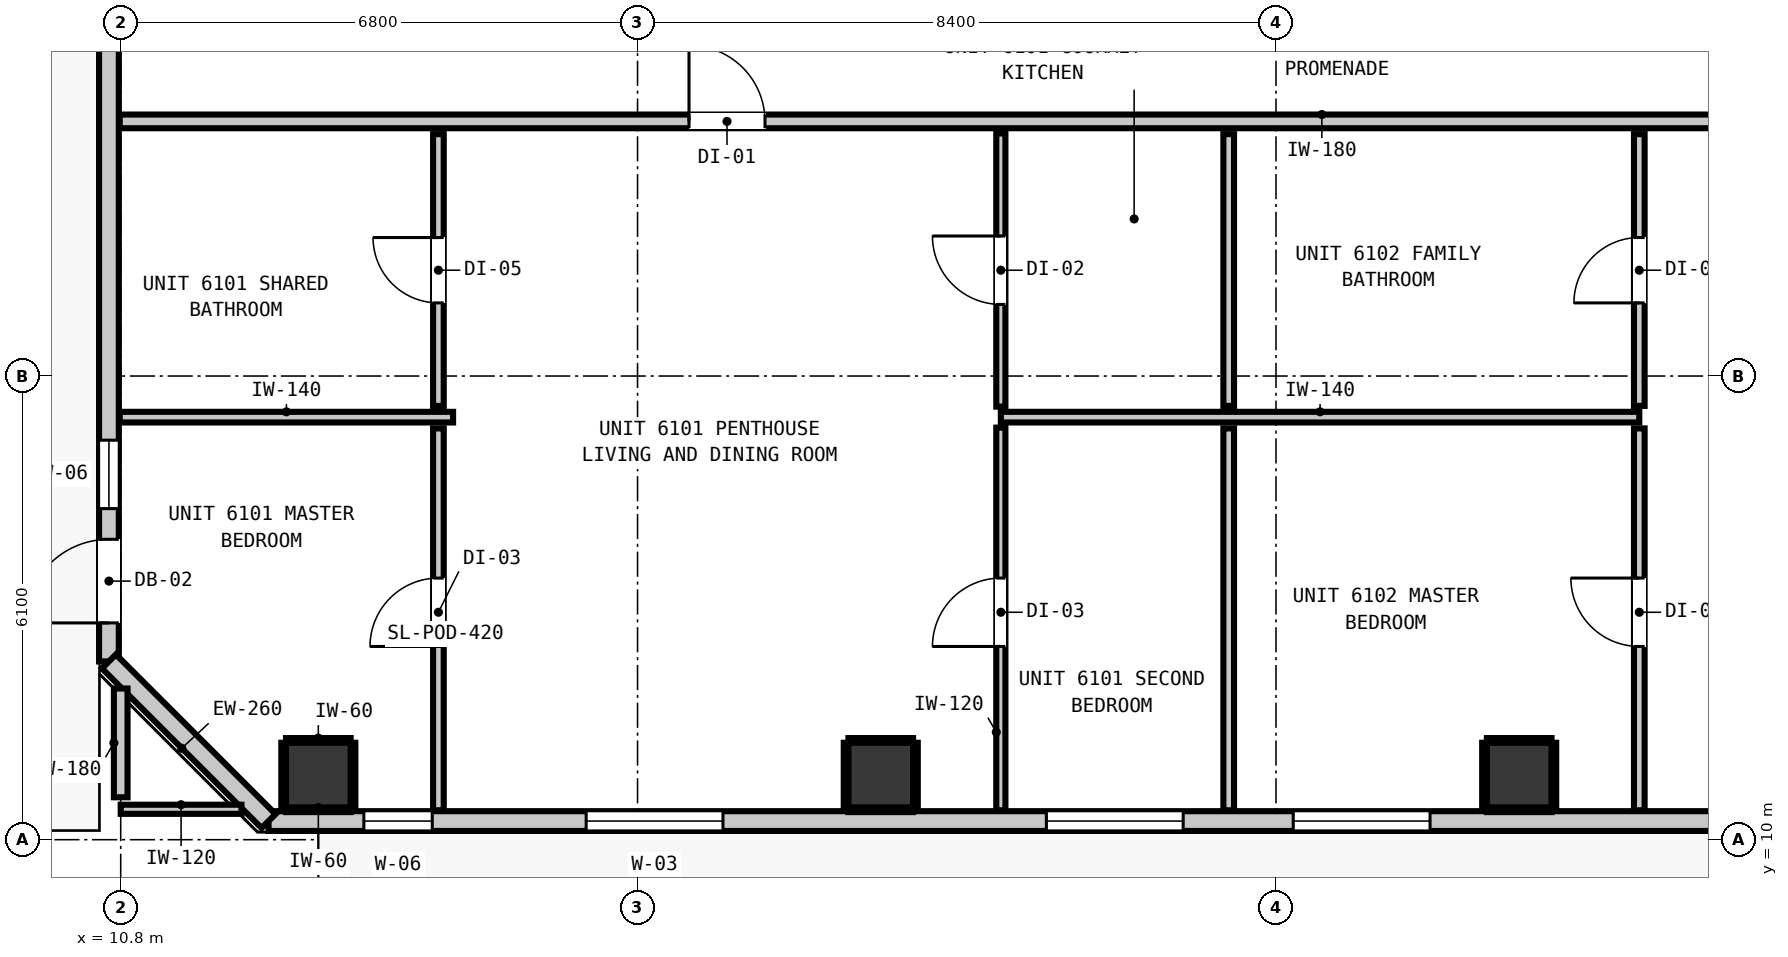
"""IFC4 building model, lengths in metres.
Left out: names, types, materials, properties, quantities, classifications, styles, units other than length and angle.
Written with IfcOpenShell. Run it as: python <this file> out.ifc"""

import sys

from ifc_helpers import new_model, si_unit, direction, frame, frame_2d, origin, origin_2d, place, context, subcontext, project, spatial, rectangle, extrude, element, fill, save


model = new_model("IFC4")
c1 = context("Model", 3, precision=1e-05, world=origin(), true_north=direction((0.0, 1.0)))
c2 = subcontext(c1, "Body", "Model", "MODEL_VIEW")
j1 = project(units=[si_unit("LENGTHUNIT", "METRE"), si_unit("PLANEANGLEUNIT", "RADIAN")], contexts=[c1])
p1 = place(None, origin())
s1 = spatial("IfcSite", under=j1, at=p1, CompositionType="ELEMENT")
p2 = place(p1, origin())
s2 = spatial("IfcBuilding", under=s1, at=p2, CompositionType="ELEMENT")
p3 = place(p2, frame((0.0, 0.0, 210.08)))
s3 = spatial("IfcBuildingStorey", under=s2, at=p3, CompositionType="ELEMENT", Elevation=210.08)
for number, where, z_axis, x_axis in (
    (1, (13.4, 10.85, -0.2), (0.0, 0.0, 1.0), (1.0, 0.0, 0.0)),
    (2, (20.8, 10.85, -0.2), (0.0, 0.0, 1.0), (1.0, 0.0, 0.0)),
    (3, (29.2, 10.85, -0.2), (0.0, 0.0, 1.0), (1.0, 0.0, 0.0)),
):
    element("IfcColumn", number, at=place(p3, frame(where, z_axis=z_axis, x_axis=x_axis)), inside=s3, PredefinedType="COLUMN", context=c2, shape_type="SweptSolid", body=[
        extrude(rectangle(XDim=0.85, YDim=0.85, at=origin_2d()), origin(), (0.0, 0.0, 1.0), 3.52),
    ])
p4 = place(p3, frame((10.645, 12.345, 0.0), z_axis=(0.0, 0.0, 1.0), x_axis=(0.0, 1.0, 0.0)))
e4 = element("IfcWall", 4, at=p4, inside=s3, PredefinedType="STANDARD", context=c2, shape_type="SweptSolid", body=[
    extrude(rectangle(XDim=30.31, YDim=0.26, at=frame_2d((15.155, 0.0))), origin(), (0.0, 0.0, 1.0), 3.1),
])
p5 = place(p4, frame((0.507, 0.0, 0.0)))
e5 = element("IfcOpeningElement", 5, at=p5, cuts=e4, PredefinedType="OPENING", context=c2, shape_type="SweptSolid", body=[
    extrude(rectangle(XDim=1.1, YDim=2.15, at=frame_2d((0.55, 1.075))), frame((0.0, 0.14, 0.0), z_axis=(0.0, -1.0, 0.0), x_axis=(1.0, 0.0, 0.0)), (0.0, 0.0, 1.0), 0.28),
])
p6 = place(p4, frame((2.011, 0.0, 0.85)))
e6 = element("IfcOpeningElement", 6, at=p6, cuts=e4, PredefinedType="OPENING", context=c2, shape_type="SweptSolid", body=[
    extrude(rectangle(XDim=0.9, YDim=1.5, at=frame_2d((0.45, 0.75))), frame((0.0, 0.14, 0.0), z_axis=(0.0, -1.0, 0.0), x_axis=(1.0, 0.0, 0.0)), (0.0, 0.0, 1.0), 0.28),
])
p7 = place(p3, frame((45.455, 10.245, 0.0), z_axis=(0.0, 0.0, 1.0), x_axis=(-1.0, 0.0, 0.0)))
e7 = element("IfcWall", 7, at=p7, inside=s3, PredefinedType="STANDARD", context=c2, shape_type="SweptSolid", body=[
    extrude(rectangle(XDim=32.71, YDim=0.26, at=frame_2d((16.355, 0.0))), origin(), (0.0, 0.0, 1.0), 3.1),
])
p8 = place(p7, frame((2.665, 0.0, 0.0)))
e8 = element("IfcOpeningElement", 8, at=p8, cuts=e7, PredefinedType="OPENING", context=c2, shape_type="SweptSolid", body=[
    extrude(rectangle(XDim=1.0, YDim=2.15, at=frame_2d((0.5, 1.075))), frame((0.0, 0.14, 0.0), z_axis=(0.0, -1.0, 0.0), x_axis=(1.0, 0.0, 0.0)), (0.0, 0.0, 1.0), 0.28),
])
p9 = place(p7, frame((26.731, 0.0, 0.85)))
e9 = element("IfcOpeningElement", 9, at=p9, cuts=e7, PredefinedType="OPENING", context=c2, shape_type="SweptSolid", body=[
    extrude(rectangle(XDim=1.8, YDim=1.9, at=frame_2d((0.9, 0.95))), frame((0.0, 0.14, 0.0), z_axis=(0.0, -1.0, 0.0), x_axis=(1.0, 0.0, 0.0)), (0.0, 0.0, 1.0), 0.28),
])
p10 = place(p7, frame((30.556, 0.0, 0.85)))
e10 = element("IfcOpeningElement", 10, at=p10, cuts=e7, PredefinedType="OPENING", context=c2, shape_type="SweptSolid", body=[
    extrude(rectangle(XDim=0.9, YDim=1.5, at=frame_2d((0.45, 0.75))), frame((0.0, 0.14, 0.0), z_axis=(0.0, -1.0, 0.0), x_axis=(1.0, 0.0, 0.0)), (0.0, 0.0, 1.0), 0.28),
])
p11 = place(p7, frame((20.676, 0.0, 0.85)))
e11 = element("IfcOpeningElement", 11, at=p11, cuts=e7, PredefinedType="OPENING", context=c2, shape_type="SweptSolid", body=[
    extrude(rectangle(XDim=1.8, YDim=1.9, at=frame_2d((0.9, 0.95))), frame((0.0, 0.14, 0.0), z_axis=(0.0, -1.0, 0.0), x_axis=(1.0, 0.0, 0.0)), (0.0, 0.0, 1.0), 0.28),
])
p12 = place(p7, frame((11.077, 0.0, 0.85)))
e12 = element("IfcOpeningElement", 12, at=p12, cuts=e7, PredefinedType="OPENING", context=c2, shape_type="SweptSolid", body=[
    extrude(rectangle(XDim=1.8, YDim=1.9, at=frame_2d((0.9, 0.95))), frame((0.0, 0.14, 0.0), z_axis=(0.0, -1.0, 0.0), x_axis=(1.0, 0.0, 0.0)), (0.0, 0.0, 1.0), 0.28),
])
p13 = place(p7, frame((17.428, 0.0, 0.85)))
e13 = element("IfcOpeningElement", 13, at=p13, cuts=e7, PredefinedType="OPENING", context=c2, shape_type="SweptSolid", body=[
    extrude(rectangle(XDim=1.8, YDim=1.9, at=frame_2d((0.9, 0.95))), frame((0.0, 0.14, 0.0), z_axis=(0.0, -1.0, 0.0), x_axis=(1.0, 0.0, 0.0)), (0.0, 0.0, 1.0), 0.28),
])
p14 = place(p7, frame((4.67, 0.0, 0.85)))
e14 = element("IfcOpeningElement", 14, at=p14, cuts=e7, PredefinedType="OPENING", context=c2, shape_type="SweptSolid", body=[
    extrude(rectangle(XDim=1.8, YDim=1.9, at=frame_2d((0.9, 0.95))), frame((0.0, 0.14, 0.0), z_axis=(0.0, -1.0, 0.0), x_axis=(1.0, 0.0, 0.0)), (0.0, 0.0, 1.0), 0.28),
])
p15 = place(p7, frame((0.548, 0.0, 0.85)))
e15 = element("IfcOpeningElement", 15, at=p15, cuts=e7, PredefinedType="OPENING", context=c2, shape_type="SweptSolid", body=[
    extrude(rectangle(XDim=1.05, YDim=1.65, at=frame_2d((0.525, 0.825))), frame((0.0, 0.14, 0.0), z_axis=(0.0, -1.0, 0.0), x_axis=(1.0, 0.0, 0.0)), (0.0, 0.0, 1.0), 0.28),
])
p16 = place(p3, frame((12.745, 10.245, 0.0), z_axis=(0.0, 0.0, 1.0), x_axis=(-0.707147883682, 0.707065676302, 0.0)))
e16 = element("IfcWall", 16, at=p16, inside=s3, PredefinedType="STANDARD", context=c2, shape_type="SweptSolid", body=[
    extrude(rectangle(XDim=2.97, YDim=0.26, at=frame_2d((1.485, 0.0))), origin(), (0.0, 0.0, 1.0), 3.1),
])
p17 = place(p3, frame((10.787, 19.45, 0.0), z_axis=(0.0, 0.0, 1.0), x_axis=(1.0, 0.0, 0.0)))
e17 = element("IfcWall", 17, at=p17, inside=s3, PredefinedType="PARTITIONING", context=c2, shape_type="SweptSolid", body=[
    extrude(rectangle(XDim=36.626, YDim=0.18, at=frame_2d((18.313, 0.0))), origin(), (0.0, 0.0, 1.0), 3.1),
])
p18 = place(p17, frame((7.49, 0.0, 0.0)))
e18 = element("IfcOpeningElement", 18, at=p18, cuts=e17, PredefinedType="OPENING", context=c2, shape_type="SweptSolid", body=[
    extrude(rectangle(XDim=1.0, YDim=2.15, at=frame_2d((0.5, 1.075))), frame((0.0, 0.1, 0.0), z_axis=(0.0, -1.0, 0.0), x_axis=(1.0, 0.0, 0.0)), (0.0, 0.0, 1.0), 0.2),
])
p19 = place(p17, frame((23.143, 0.0, 0.0)))
e19 = element("IfcOpeningElement", 19, at=p19, cuts=e17, PredefinedType="OPENING", context=c2, shape_type="SweptSolid", body=[
    extrude(rectangle(XDim=1.0, YDim=2.15, at=frame_2d((0.5, 1.075))), frame((0.0, 0.1, 0.0), z_axis=(0.0, -1.0, 0.0), x_axis=(1.0, 0.0, 0.0)), (0.0, 0.0, 1.0), 0.2),
])
p20 = place(p3, frame((10.787, 15.559, 0.0), z_axis=(0.0, 0.0, 1.0), x_axis=(1.0, 0.0, 0.0)))
e20 = element("IfcWall", 20, at=p20, inside=s3, PredefinedType="PARTITIONING", context=c2, shape_type="SweptSolid", body=[
    extrude(rectangle(XDim=4.386, YDim=0.14, at=frame_2d((2.193, 0.0))), origin(), (0.0, 0.0, 1.0), 3.1),
])
p21 = place(p3, frame((22.38, 15.559, 0.0), z_axis=(0.0, 0.0, 1.0), x_axis=(1.0, 0.0, 0.0)))
e21 = element("IfcWall", 21, at=p21, inside=s3, PredefinedType="PARTITIONING", context=c2, shape_type="SweptSolid", body=[
    extrude(rectangle(XDim=8.4, YDim=0.14, at=frame_2d((4.2, 0.0))), origin(), (0.0, 0.0, 1.0), 3.1),
])
p22 = place(p3, frame((10.8, 10.4, 0.0), z_axis=(0.0, 0.0, 1.0), x_axis=(1.0, 0.0, 0.0)))
e22 = element("IfcWall", 22, at=p22, inside=s3, PredefinedType="PARTITIONING", context=c2, shape_type="SweptSolid", body=[
    extrude(rectangle(XDim=1.589, YDim=0.12, at=frame_2d((0.794, 0.0))), origin(), (0.0, 0.0, 1.0), 3.1),
])
p23 = place(p3, frame((10.8, 10.558, 0.0), z_axis=(0.0, 0.0, 1.0), x_axis=(0.0, 1.0, 0.0)))
e23 = element("IfcWall", 23, at=p23, inside=s3, PredefinedType="PARTITIONING", context=c2, shape_type="SweptSolid", body=[
    extrude(rectangle(XDim=1.431, YDim=0.18, at=frame_2d((0.715, 0.0))), origin(), (0.0, 0.0, 1.0), 3.1),
])
p24 = place(p3, frame((14.98, 10.387, 0.0), z_axis=(0.0, 0.0, 1.0), x_axis=(0.0, 1.0, 0.0)))
e24 = element("IfcWall", 24, at=p24, inside=s3, PredefinedType="PARTITIONING", context=c2, shape_type="SweptSolid", body=[
    extrude(rectangle(XDim=5.024, YDim=0.14, at=frame_2d((2.512, 0.0))), origin(), (0.0, 0.0, 1.0), 3.1),
])
p25 = place(p24, frame((2.155, 0.0, 0.0)))
e25 = element("IfcOpeningElement", 25, at=p25, cuts=e24, PredefinedType="OPENING", context=c2, shape_type="SweptSolid", body=[
    extrude(rectangle(XDim=0.9, YDim=2.1, at=frame_2d((0.45, 1.05))), frame((0.0, 0.08, 0.0), z_axis=(0.0, -1.0, 0.0), x_axis=(1.0, 0.0, 0.0)), (0.0, 0.0, 1.0), 0.16),
])
p26 = place(p3, frame((14.98, 15.707, 0.0), z_axis=(0.0, 0.0, 1.0), x_axis=(0.0, 1.0, 0.0)))
e26 = element("IfcWall", 26, at=p26, inside=s3, PredefinedType="PARTITIONING", context=c2, shape_type="SweptSolid", body=[
    extrude(rectangle(XDim=3.575, YDim=0.14, at=frame_2d((1.788, 0.0))), origin(), (0.0, 0.0, 1.0), 3.1),
])
p27 = place(p26, frame((1.355, 0.0, 0.0)))
e27 = element("IfcOpeningElement", 27, at=p27, cuts=e26, PredefinedType="OPENING", context=c2, shape_type="SweptSolid", body=[
    extrude(rectangle(XDim=0.86, YDim=2.02, at=frame_2d((0.43, 1.01))), frame((0.0, 0.08, 0.0), z_axis=(0.0, -1.0, 0.0), x_axis=(1.0, 0.0, 0.0)), (0.0, 0.0, 1.0), 0.16),
])
p28 = place(p3, frame((25.378, 10.387, 0.0), z_axis=(0.0, 0.0, 1.0), x_axis=(0.0, 1.0, 0.0)))
e28 = element("IfcWall", 28, at=p28, inside=s3, PredefinedType="PARTITIONING", context=c2, shape_type="SweptSolid", body=[
    extrude(rectangle(XDim=5.024, YDim=0.14, at=frame_2d((2.512, 0.0))), origin(), (0.0, 0.0, 1.0), 3.1),
])
p29 = place(p3, frame((25.378, 15.707, 0.0), z_axis=(0.0, 0.0, 1.0), x_axis=(0.0, 1.0, 0.0)))
e29 = element("IfcWall", 29, at=p29, inside=s3, PredefinedType="PARTITIONING", context=c2, shape_type="SweptSolid", body=[
    extrude(rectangle(XDim=3.575, YDim=0.14, at=frame_2d((1.788, 0.0))), origin(), (0.0, 0.0, 1.0), 3.1),
])
p30 = place(p3, frame((30.78, 10.387, 0.0), z_axis=(0.0, 0.0, 1.0), x_axis=(0.0, 1.0, 0.0)))
e30 = element("IfcWall", 30, at=p30, inside=s3, PredefinedType="PARTITIONING", context=c2, shape_type="SweptSolid", body=[
    extrude(rectangle(XDim=5.024, YDim=0.14, at=frame_2d((2.512, 0.0))), origin(), (0.0, 0.0, 1.0), 3.1),
])
p31 = place(p30, frame((2.155, 0.0, 0.0)))
e31 = element("IfcOpeningElement", 31, at=p31, cuts=e30, PredefinedType="OPENING", context=c2, shape_type="SweptSolid", body=[
    extrude(rectangle(XDim=0.9, YDim=2.1, at=frame_2d((0.45, 1.05))), frame((0.0, 0.08, 0.0), z_axis=(0.0, -1.0, 0.0), x_axis=(1.0, 0.0, 0.0)), (0.0, 0.0, 1.0), 0.16),
])
p32 = place(p3, frame((30.78, 15.707, 0.0), z_axis=(0.0, 0.0, 1.0), x_axis=(0.0, 1.0, 0.0)))
e32 = element("IfcWall", 32, at=p32, inside=s3, PredefinedType="PARTITIONING", context=c2, shape_type="SweptSolid", body=[
    extrude(rectangle(XDim=3.575, YDim=0.14, at=frame_2d((1.788, 0.0))), origin(), (0.0, 0.0, 1.0), 3.1),
])
p33 = place(p32, frame((1.355, 0.0, 0.0)))
e33 = element("IfcOpeningElement", 33, at=p33, cuts=e32, PredefinedType="OPENING", context=c2, shape_type="SweptSolid", body=[
    extrude(rectangle(XDim=0.86, YDim=2.02, at=frame_2d((0.43, 1.01))), frame((0.0, 0.08, 0.0), z_axis=(0.0, -1.0, 0.0), x_axis=(1.0, 0.0, 0.0)), (0.0, 0.0, 1.0), 0.16),
])
p34 = place(p3, frame((22.38, 10.387, 0.0), z_axis=(0.0, 0.0, 1.0), x_axis=(0.0, 1.0, 0.0)))
e34 = element("IfcWall", 34, at=p34, inside=s3, PredefinedType="PARTITIONING", context=c2, shape_type="SweptSolid", body=[
    extrude(rectangle(XDim=5.034, YDim=0.12, at=frame_2d((2.517, 0.0))), origin(), (0.0, 0.0, 1.0), 3.1),
])
p35 = place(p34, frame((2.155, 0.0, 0.0)))
e35 = element("IfcOpeningElement", 35, at=p35, cuts=e34, PredefinedType="OPENING", context=c2, shape_type="SweptSolid", body=[
    extrude(rectangle(XDim=0.9, YDim=2.1, at=frame_2d((0.45, 1.05))), frame((0.0, 0.07, 0.0), z_axis=(0.0, -1.0, 0.0), x_axis=(1.0, 0.0, 0.0)), (0.0, 0.0, 1.0), 0.14),
])
p36 = place(p3, frame((22.38, 15.697, 0.0), z_axis=(0.0, 0.0, 1.0), x_axis=(0.0, 1.0, 0.0)))
e36 = element("IfcWall", 36, at=p36, inside=s3, PredefinedType="PARTITIONING", context=c2, shape_type="SweptSolid", body=[
    extrude(rectangle(XDim=3.595, YDim=0.12, at=frame_2d((1.797, 0.0))), origin(), (0.0, 0.0, 1.0), 3.1),
])
p37 = place(p36, frame((1.345, 0.0, 0.0)))
e37 = element("IfcOpeningElement", 37, at=p37, cuts=e36, PredefinedType="OPENING", context=c2, shape_type="SweptSolid", body=[
    extrude(rectangle(XDim=0.9, YDim=2.1, at=frame_2d((0.45, 1.05))), frame((0.0, 0.07, 0.0), z_axis=(0.0, -1.0, 0.0), x_axis=(1.0, 0.0, 0.0)), (0.0, 0.0, 1.0), 0.14),
])
for number, where, z_axis, x_axis in (
    (38, (12.975, 10.393, 0.0), (0.0, 0.0, 1.0), (1.0, 0.0, 0.0)),
    (39, (12.975, 11.307, 0.0), (0.0, 0.0, 1.0), (1.0, 0.0, 0.0)),
    (40, (12.943, 10.425, 0.0), (0.0, 0.0, 1.0), (0.0, 1.0, 0.0)),
    (41, (13.857, 10.425, 0.0), (0.0, 0.0, 1.0), (0.0, 1.0, 0.0)),
):
    element("IfcWall", number, at=place(p3, frame(where, z_axis=z_axis, x_axis=x_axis)), inside=s3, PredefinedType="PARTITIONING", context=c2, shape_type="SweptSolid", body=[
        extrude(rectangle(XDim=0.85, YDim=0.06, at=frame_2d((0.425, 0.0))), origin(), (0.0, 0.0, 1.0), 1.45),
    ])
for number, where, z_axis, x_axis in (
    (42, (20.375, 10.393, 0.0), (0.0, 0.0, 1.0), (1.0, 0.0, 0.0)),
    (43, (20.375, 11.307, 0.0), (0.0, 0.0, 1.0), (1.0, 0.0, 0.0)),
):
    element("IfcWall", number, at=place(p3, frame(where, z_axis=z_axis, x_axis=x_axis)), inside=s3, PredefinedType="PARTITIONING", context=c2, shape_type="SweptSolid", body=[
        extrude(rectangle(XDim=0.85, YDim=0.06, at=frame_2d((0.425, 0.0))), origin(), (0.0, 0.0, 1.0), 1.45),
    ])
for number, where, z_axis, x_axis in (
    (44, (20.343, 10.425, 0.0), (0.0, 0.0, 1.0), (0.0, 1.0, 0.0)),
    (45, (21.257, 10.425, 0.0), (0.0, 0.0, 1.0), (0.0, 1.0, 0.0)),
):
    element("IfcWall", number, at=place(p3, frame(where, z_axis=z_axis, x_axis=x_axis)), inside=s3, PredefinedType="PARTITIONING", context=c2, shape_type="SweptSolid", body=[
        extrude(rectangle(XDim=0.85, YDim=0.06, at=frame_2d((0.425, 0.0))), origin(), (0.0, 0.0, 1.0), 1.45),
    ])
for number, where, z_axis, x_axis in (
    (46, (28.775, 10.393, 0.0), (0.0, 0.0, 1.0), (1.0, 0.0, 0.0)),
    (47, (28.775, 11.307, 0.0), (0.0, 0.0, 1.0), (1.0, 0.0, 0.0)),
):
    element("IfcWall", number, at=place(p3, frame(where, z_axis=z_axis, x_axis=x_axis)), inside=s3, PredefinedType="PARTITIONING", context=c2, shape_type="SweptSolid", body=[
        extrude(rectangle(XDim=0.85, YDim=0.06, at=frame_2d((0.425, 0.0))), origin(), (0.0, 0.0, 1.0), 1.45),
    ])
for number, where, z_axis, x_axis in (
    (48, (28.743, 10.425, 0.0), (0.0, 0.0, 1.0), (0.0, 1.0, 0.0)),
    (49, (29.657, 10.425, 0.0), (0.0, 0.0, 1.0), (0.0, 1.0, 0.0)),
):
    element("IfcWall", number, at=place(p3, frame(where, z_axis=z_axis, x_axis=x_axis)), inside=s3, PredefinedType="PARTITIONING", context=c2, shape_type="SweptSolid", body=[
        extrude(rectangle(XDim=0.85, YDim=0.06, at=frame_2d((0.425, 0.0))), origin(), (0.0, 0.0, 1.0), 1.45),
    ])
p38 = place(p5, origin())
e50 = element("IfcDoor", 50, at=p38, inside=s3, OperationType="SINGLE_SWING_LEFT", PredefinedType="DOOR", context=c2, shape_type="SweptSolid", body=[
    extrude(rectangle(XDim=1.1, YDim=2.15, at=frame_2d((0.55, 1.075))), frame((0.0, 0.025, 0.0), z_axis=(0.0, -1.0, 0.0), x_axis=(1.0, 0.0, 0.0)), (0.0, 0.0, 1.0), 0.05),
])
fill(e5, e50)
p39 = place(p6, origin())
e51 = element("IfcWindow", 51, at=p39, inside=s3, PartitioningType="SINGLE_PANEL", PredefinedType="WINDOW", context=c2, shape_type="SweptSolid", body=[
    extrude(rectangle(XDim=0.9, YDim=1.5, at=frame_2d((0.45, 0.75))), frame((0.0, 0.03, 0.0), z_axis=(0.0, -1.0, 0.0), x_axis=(1.0, 0.0, 0.0)), (0.0, 0.0, 1.0), 0.06),
])
fill(e6, e51)
p40 = place(p9, origin())
e52 = element("IfcWindow", 52, at=p40, inside=s3, PartitioningType="SINGLE_PANEL", PredefinedType="WINDOW", context=c2, shape_type="SweptSolid", body=[
    extrude(rectangle(XDim=1.8, YDim=1.9, at=frame_2d((0.9, 0.95))), frame((0.0, 0.03, 0.0), z_axis=(0.0, -1.0, 0.0), x_axis=(1.0, 0.0, 0.0)), (0.0, 0.0, 1.0), 0.06),
])
fill(e9, e52)
p41 = place(p10, origin())
e53 = element("IfcWindow", 53, at=p41, inside=s3, PartitioningType="SINGLE_PANEL", PredefinedType="WINDOW", context=c2, shape_type="SweptSolid", body=[
    extrude(rectangle(XDim=0.9, YDim=1.5, at=frame_2d((0.45, 0.75))), frame((0.0, 0.03, 0.0), z_axis=(0.0, -1.0, 0.0), x_axis=(1.0, 0.0, 0.0)), (0.0, 0.0, 1.0), 0.06),
])
fill(e10, e53)
p42 = place(p11, origin())
e54 = element("IfcWindow", 54, at=p42, inside=s3, PartitioningType="SINGLE_PANEL", PredefinedType="WINDOW", context=c2, shape_type="SweptSolid", body=[
    extrude(rectangle(XDim=1.8, YDim=1.9, at=frame_2d((0.9, 0.95))), frame((0.0, 0.03, 0.0), z_axis=(0.0, -1.0, 0.0), x_axis=(1.0, 0.0, 0.0)), (0.0, 0.0, 1.0), 0.06),
])
fill(e11, e54)
p43 = place(p13, origin())
e55 = element("IfcWindow", 55, at=p43, inside=s3, PartitioningType="SINGLE_PANEL", PredefinedType="WINDOW", context=c2, shape_type="SweptSolid", body=[
    extrude(rectangle(XDim=1.8, YDim=1.9, at=frame_2d((0.9, 0.95))), frame((0.0, 0.03, 0.0), z_axis=(0.0, -1.0, 0.0), x_axis=(1.0, 0.0, 0.0)), (0.0, 0.0, 1.0), 0.06),
])
fill(e13, e55)
p44 = place(p18, origin())
e56 = element("IfcDoor", 56, at=p44, inside=s3, OperationType="SINGLE_SWING_LEFT", PredefinedType="DOOR", context=c2, shape_type="SweptSolid", body=[
    extrude(rectangle(XDim=1.0, YDim=2.15, at=frame_2d((0.5, 1.075))), frame((0.0, 0.025, 0.0), z_axis=(0.0, -1.0, 0.0), x_axis=(1.0, 0.0, 0.0)), (0.0, 0.0, 1.0), 0.05),
])
fill(e18, e56)
p45 = place(p27, origin())
e57 = element("IfcDoor", 57, at=p45, inside=s3, OperationType="SINGLE_SWING_RIGHT", PredefinedType="DOOR", context=c2, shape_type="SweptSolid", body=[
    extrude(rectangle(XDim=0.86, YDim=2.02, at=frame_2d((0.43, 1.01))), frame((0.0, 0.025, 0.0), z_axis=(0.0, -1.0, 0.0), x_axis=(1.0, 0.0, 0.0)), (0.0, 0.0, 1.0), 0.05),
])
fill(e27, e57)
p46 = place(p25, origin())
e58 = element("IfcDoor", 58, at=p46, inside=s3, OperationType="SINGLE_SWING_LEFT", PredefinedType="DOOR", context=c2, shape_type="SweptSolid", body=[
    extrude(rectangle(XDim=0.9, YDim=2.1, at=frame_2d((0.45, 1.05))), frame((0.0, 0.025, 0.0), z_axis=(0.0, -1.0, 0.0), x_axis=(1.0, 0.0, 0.0)), (0.0, 0.0, 1.0), 0.05),
])
fill(e25, e58)
p47 = place(p37, origin())
e59 = element("IfcDoor", 59, at=p47, inside=s3, OperationType="SINGLE_SWING_RIGHT", PredefinedType="DOOR", context=c2, shape_type="SweptSolid", body=[
    extrude(rectangle(XDim=0.9, YDim=2.1, at=frame_2d((0.45, 1.05))), frame((0.0, 0.025, 0.0), z_axis=(0.0, -1.0, 0.0), x_axis=(1.0, 0.0, 0.0)), (0.0, 0.0, 1.0), 0.05),
])
fill(e37, e59)
p48 = place(p35, origin())
e60 = element("IfcDoor", 60, at=p48, inside=s3, OperationType="SINGLE_SWING_LEFT", PredefinedType="DOOR", context=c2, shape_type="SweptSolid", body=[
    extrude(rectangle(XDim=0.9, YDim=2.1, at=frame_2d((0.45, 1.05))), frame((0.0, 0.025, 0.0), z_axis=(0.0, -1.0, 0.0), x_axis=(1.0, 0.0, 0.0)), (0.0, 0.0, 1.0), 0.05),
])
fill(e35, e60)
p49 = place(p33, origin())
e61 = element("IfcDoor", 61, at=p49, inside=s3, OperationType="SINGLE_SWING_LEFT", PredefinedType="DOOR", context=c2, shape_type="SweptSolid", body=[
    extrude(rectangle(XDim=0.86, YDim=2.02, at=frame_2d((0.43, 1.01))), frame((0.0, 0.025, 0.0), z_axis=(0.0, -1.0, 0.0), x_axis=(1.0, 0.0, 0.0)), (0.0, 0.0, 1.0), 0.05),
])
fill(e33, e61)
p50 = place(p31, origin())
e62 = element("IfcDoor", 62, at=p50, inside=s3, OperationType="SINGLE_SWING_RIGHT", PredefinedType="DOOR", context=c2, shape_type="SweptSolid", body=[
    extrude(rectangle(XDim=0.9, YDim=2.1, at=frame_2d((0.45, 1.05))), frame((0.0, 0.025, 0.0), z_axis=(0.0, -1.0, 0.0), x_axis=(1.0, 0.0, 0.0)), (0.0, 0.0, 1.0), 0.05),
])
fill(e31, e62)
save(model, sys.argv[1])
